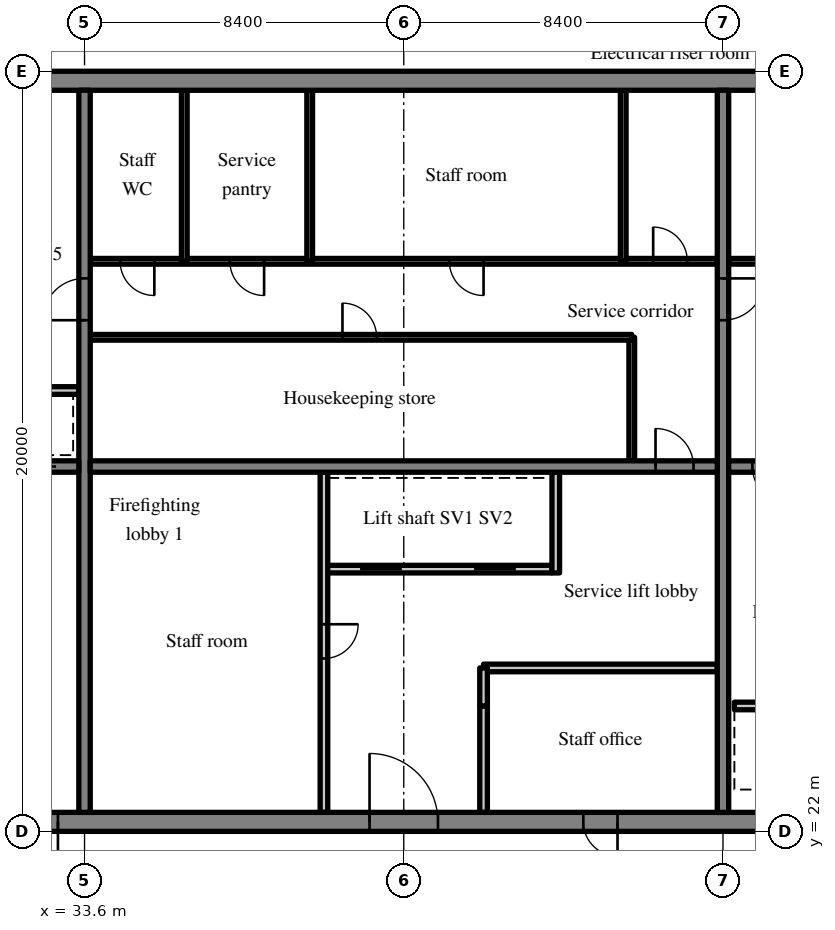
"""IFC4 building model, lengths in metres.
Left out: names, types, materials, properties, quantities, classifications, styles, units other than length and angle.
Written with IfcOpenShell. Run it as: python <this file> out.ifc"""

import sys

from ifc_helpers import new_model, si_unit, direction, frame, frame_2d, origin, place, context, subcontext, project, spatial, rectangle, extrude, source, transform, mapped, element, fill, save


model = new_model("IFC4")
c1 = context("Model", 3, precision=1e-05, world=origin(), true_north=direction((0.0, 1.0)))
c2 = subcontext(c1, "Body", "Model", "MODEL_VIEW")
j1 = project(units=[si_unit("LENGTHUNIT", "METRE"), si_unit("PLANEANGLEUNIT", "RADIAN")], contexts=[c1])
p1 = place(None, origin())
s1 = spatial("IfcSite", under=j1, at=p1, CompositionType="ELEMENT")
p2 = place(p1, origin())
s2 = spatial("IfcBuilding", under=s1, at=p2, CompositionType="ELEMENT")
p3 = place(p2, frame((0.0, 0.0, 277.7)))
s3 = spatial("IfcBuildingStorey", under=s2, at=p3, CompositionType="ELEMENT", Elevation=277.7)
m1 = source(origin(), c2, "Body", "SweptSolid", [
    extrude(rectangle(XDim=50.4, YDim=0.5, at=frame_2d((25.2, 0.0))), origin(), (0.0, 0.0, 1.0), 3.72),
])
p4 = place(p3, frame((25.2, 22.25, 0.0), z_axis=(0.0, 0.0, 1.0), x_axis=(1.0, 0.0, 0.0)))
e1 = element("IfcWall", 1, at=p4, inside=s3, PredefinedType="SHEAR", context=c2, shape_type="MappedRepresentation", body=[
    mapped(m1, transform((0.0, 0.0, 0.0), scale=1.0)),
])
m2 = source(origin(), c2, "Body", "SweptSolid", [
    extrude(rectangle(XDim=1.8, YDim=2.1, at=frame_2d((0.9, 1.05))), frame((0.0, 0.26, 0.0), z_axis=(0.0, -1.0, 0.0), x_axis=(1.0, 0.0, 0.0)), (0.0, 0.0, 1.0), 0.52),
])
p5 = place(p4, frame((15.9, 0.0, 0.0)))
e2 = element("IfcOpeningElement", 2, at=p5, cuts=e1, PredefinedType="OPENING", context=c2, shape_type="MappedRepresentation", body=[
    mapped(m2, transform((0.0, 0.0, 0.0), scale=1.0)),
])
m3 = source(origin(), c2, "Body", "SweptSolid", [
    extrude(rectangle(XDim=0.9, YDim=2.1, at=frame_2d((0.45, 1.05))), frame((0.0, 0.26, 0.0), z_axis=(0.0, -1.0, 0.0), x_axis=(1.0, 0.0, 0.0)), (0.0, 0.0, 1.0), 0.52),
])
p6 = place(p4, frame((21.525, 0.0, 0.0)))
e3 = element("IfcOpeningElement", 3, at=p6, cuts=e1, PredefinedType="OPENING", context=c2, shape_type="MappedRepresentation", body=[
    mapped(m3, transform((0.0, 0.0, 0.0), scale=1.0)),
])
p7 = place(p4, frame((32.7, 0.0, 0.0)))
e4 = element("IfcOpeningElement", 4, at=p7, cuts=e1, PredefinedType="OPENING", context=c2, shape_type="MappedRepresentation", body=[
    mapped(m2, transform((0.0, 0.0, 0.0), scale=1.0)),
])
m4 = source(origin(), c2, "Body", "SweptSolid", [
    extrude(rectangle(XDim=1.2, YDim=2.1, at=frame_2d((0.6, 1.05))), frame((0.0, 0.26, 0.0), z_axis=(0.0, -1.0, 0.0), x_axis=(1.0, 0.0, 0.0)), (0.0, 0.0, 1.0), 0.52),
])
p8 = place(p4, frame((6.5, 0.0, 0.0)))
e5 = element("IfcOpeningElement", 5, at=p8, cuts=e1, PredefinedType="OPENING", context=c2, shape_type="MappedRepresentation", body=[
    mapped(m4, transform((0.0, 0.0, 0.0), scale=1.0)),
])
p9 = place(p4, frame((47.975, 0.0, 0.0)))
e6 = element("IfcOpeningElement", 6, at=p9, cuts=e1, PredefinedType="OPENING", context=c2, shape_type="MappedRepresentation", body=[
    mapped(m4, transform((0.0, 0.0, 0.0), scale=1.0)),
])
p10 = place(p3, frame((25.2, 41.75, 0.0), z_axis=(0.0, 0.0, 1.0), x_axis=(1.0, 0.0, 0.0)))
e7 = element("IfcWall", 7, at=p10, inside=s3, PredefinedType="SHEAR", context=c2, shape_type="MappedRepresentation", body=[
    mapped(m1, transform((0.0, 0.0, 0.0), scale=1.0)),
])
m5 = source(origin(), c2, "Body", "SweptSolid", [
    extrude(rectangle(XDim=19.0, YDim=0.3, at=frame_2d((9.5, 0.0))), origin(), (0.0, 0.0, 1.0), 3.72),
])
p11 = place(p3, frame((33.6, 22.5, 0.0), z_axis=(0.0, 0.0, 1.0), x_axis=(0.0, 1.0, 0.0)))
e8 = element("IfcWall", 8, at=p11, inside=s3, PredefinedType="SHEAR", context=c2, shape_type="MappedRepresentation", body=[
    mapped(m5, transform((0.0, 0.0, 0.0), scale=1.0)),
])
m6 = source(origin(), c2, "Body", "SweptSolid", [
    extrude(rectangle(XDim=1.1, YDim=2.1, at=frame_2d((0.55, 1.05))), frame((0.0, 0.16, 0.0), z_axis=(0.0, -1.0, 0.0), x_axis=(1.0, 0.0, 0.0)), (0.0, 0.0, 1.0), 0.32),
])
p12 = place(p11, frame((12.95, 0.0, 0.0)))
e9 = element("IfcOpeningElement", 9, at=p12, cuts=e8, PredefinedType="OPENING", context=c2, shape_type="MappedRepresentation", body=[
    mapped(m6, transform((0.0, 0.0, 0.0), scale=1.0)),
])
p13 = place(p3, frame((50.4, 22.5, 0.0), z_axis=(0.0, 0.0, 1.0), x_axis=(0.0, 1.0, 0.0)))
e10 = element("IfcWall", 10, at=p13, inside=s3, PredefinedType="SHEAR", context=c2, shape_type="MappedRepresentation", body=[
    mapped(m5, transform((0.0, 0.0, 0.0), scale=1.0)),
])
p14 = place(p13, frame((12.95, 0.0, 0.0)))
e11 = element("IfcOpeningElement", 11, at=p14, cuts=e10, PredefinedType="OPENING", context=c2, shape_type="MappedRepresentation", body=[
    mapped(m6, transform((0.0, 0.0, 0.0), scale=1.0)),
])
m7 = source(origin(), c2, "Body", "SweptSolid", [
    extrude(rectangle(XDim=7.75, YDim=0.3, at=frame_2d((3.875, 0.0))), origin(), (0.0, 0.0, 1.0), 3.72),
])
p15 = place(p3, frame((25.7, 31.6, 0.0), z_axis=(0.0, 0.0, 1.0), x_axis=(1.0, 0.0, 0.0)))
e12 = element("IfcWall", 12, at=p15, inside=s3, PredefinedType="SHEAR", context=c2, shape_type="MappedRepresentation", body=[
    mapped(m7, transform((0.0, 0.0, 0.0), scale=1.0)),
])
p16 = place(p15, frame((6.05, 0.0, 0.0)))
e13 = element("IfcOpeningElement", 13, at=p16, cuts=e12, PredefinedType="OPENING", context=c2, shape_type="MappedRepresentation", body=[
    mapped(m6, transform((0.0, 0.0, 0.0), scale=1.0)),
])
m8 = source(origin(), c2, "Body", "SweptSolid", [
    extrude(rectangle(XDim=16.5, YDim=0.3, at=frame_2d((8.25, 0.0))), origin(), (0.0, 0.0, 1.0), 3.72),
])
p17 = place(p3, frame((33.75, 31.6, 0.0), z_axis=(0.0, 0.0, 1.0), x_axis=(1.0, 0.0, 0.0)))
e14 = element("IfcWall", 14, at=p17, inside=s3, PredefinedType="SHEAR", context=c2, shape_type="MappedRepresentation", body=[
    mapped(m8, transform((0.0, 0.0, 0.0), scale=1.0)),
])
m9 = source(origin(), c2, "Body", "SweptSolid", [
    extrude(rectangle(XDim=1.0, YDim=2.1, at=frame_2d((0.5, 1.05))), frame((0.0, 0.16, 0.0), z_axis=(0.0, -1.0, 0.0), x_axis=(1.0, 0.0, 0.0)), (0.0, 0.0, 1.0), 0.32),
])
p18 = place(p17, frame((14.875, 0.0, 0.0)))
e15 = element("IfcOpeningElement", 15, at=p18, cuts=e14, PredefinedType="OPENING", context=c2, shape_type="MappedRepresentation", body=[
    mapped(m9, transform((0.0, 0.0, 0.0), scale=1.0)),
])
p19 = place(p3, frame((50.55, 31.6, 0.0), z_axis=(0.0, 0.0, 1.0), x_axis=(1.0, 0.0, 0.0)))
e16 = element("IfcWall", 16, at=p19, inside=s3, PredefinedType="SHEAR", context=c2, shape_type="MappedRepresentation", body=[
    mapped(m8, transform((0.0, 0.0, 0.0), scale=1.0)),
])
p20 = place(p19, frame((0.625, 0.0, 0.0)))
e17 = element("IfcOpeningElement", 17, at=p20, cuts=e16, PredefinedType="OPENING", context=c2, shape_type="MappedRepresentation", body=[
    mapped(m9, transform((0.0, 0.0, 0.0), scale=1.0)),
])
m10 = source(origin(), c2, "Body", "SweptSolid", [
    extrude(rectangle(XDim=6.0, YDim=0.2, at=frame_2d((3.0, 0.0))), origin(), (0.0, 0.0, 1.0), 3.72),
])
p21 = place(p3, frame((39.9, 28.9, 0.0), z_axis=(0.0, 0.0, 1.0), x_axis=(1.0, 0.0, 0.0)))
e18 = element("IfcWall", 18, at=p21, inside=s3, PredefinedType="SOLIDWALL", context=c2, shape_type="MappedRepresentation", body=[
    mapped(m10, transform((0.0, 0.0, 0.0), scale=1.0)),
])
m11 = source(origin(), c2, "Body", "SweptSolid", [
    extrude(rectangle(XDim=1.1, YDim=2.1, at=frame_2d((0.55, 1.05))), frame((0.0, 0.11, 0.0), z_axis=(0.0, -1.0, 0.0), x_axis=(1.0, 0.0, 0.0)), (0.0, 0.0, 1.0), 0.22),
])
p22 = place(p21, frame((0.95, 0.0, 0.0)))
e19 = element("IfcOpeningElement", 19, at=p22, cuts=e18, PredefinedType="OPENING", context=c2, shape_type="MappedRepresentation", body=[
    mapped(m11, transform((0.0, 0.0, 0.0), scale=1.0)),
])
p23 = place(p21, frame((3.95, 0.0, 0.0)))
e20 = element("IfcOpeningElement", 20, at=p23, cuts=e18, PredefinedType="OPENING", context=c2, shape_type="MappedRepresentation", body=[
    mapped(m11, transform((0.0, 0.0, 0.0), scale=1.0)),
])
m12 = source(origin(), c2, "Body", "SweptSolid", [
    extrude(rectangle(XDim=8.95, YDim=0.2, at=frame_2d((4.475, 0.0))), origin(), (0.0, 0.0, 1.0), 3.72),
])
p24 = place(p3, frame((39.9, 22.5, 0.0), z_axis=(0.0, 0.0, 1.0), x_axis=(0.0, 1.0, 0.0)))
e21 = element("IfcWall", 21, at=p24, inside=s3, PredefinedType="PARTITIONING", context=c2, shape_type="MappedRepresentation", body=[
    mapped(m12, transform((0.0, 0.0, 0.0), scale=1.0)),
])
m13 = source(origin(), c2, "Body", "SweptSolid", [
    extrude(rectangle(XDim=0.9, YDim=2.1, at=frame_2d((0.45, 1.05))), frame((0.0, 0.11, 0.0), z_axis=(0.0, -1.0, 0.0), x_axis=(1.0, 0.0, 0.0)), (0.0, 0.0, 1.0), 0.22),
])
p25 = place(p24, frame((4.05, 0.0, 0.0)))
e22 = element("IfcOpeningElement", 22, at=p25, cuts=e21, PredefinedType="OPENING", context=c2, shape_type="MappedRepresentation", body=[
    mapped(m13, transform((0.0, 0.0, 0.0), scale=1.0)),
])
m14 = source(origin(), c2, "Body", "SweptSolid", [
    extrude(rectangle(XDim=2.8, YDim=0.2, at=frame_2d((1.4, 0.0))), origin(), (0.0, 0.0, 1.0), 3.72),
])
p26 = place(p3, frame((44.1, 22.5, 0.0), z_axis=(0.0, 0.0, 1.0), x_axis=(0.0, 1.0, 0.0)))
e23 = element("IfcWall", 23, at=p26, inside=s3, PredefinedType="PARTITIONING", context=c2, shape_type="MappedRepresentation", body=[
    mapped(m14, transform((0.0, 0.0, 0.0), scale=1.0)),
])
m15 = source(origin(), c2, "Body", "SweptSolid", [
    extrude(rectangle(XDim=2.65, YDim=0.2, at=frame_2d((1.325, 0.0))), origin(), (0.0, 0.0, 1.0), 3.72),
])
p27 = place(p3, frame((46.0, 28.8, 0.0), z_axis=(0.0, 0.0, 1.0), x_axis=(0.0, 1.0, 0.0)))
e24 = element("IfcWall", 24, at=p27, inside=s3, PredefinedType="SOLIDWALL", context=c2, shape_type="MappedRepresentation", body=[
    mapped(m15, transform((0.0, 0.0, 0.0), scale=1.0)),
])
m16 = source(origin(), c2, "Body", "SweptSolid", [
    extrude(rectangle(XDim=6.15, YDim=0.2, at=frame_2d((3.075, 0.0))), origin(), (0.0, 0.0, 1.0), 3.72),
])
p28 = place(p3, frame((44.1, 26.3, 0.0), z_axis=(0.0, 0.0, 1.0), x_axis=(1.0, 0.0, 0.0)))
e25 = element("IfcWall", 25, at=p28, inside=s3, PredefinedType="PARTITIONING", context=c2, shape_type="MappedRepresentation", body=[
    mapped(m16, transform((0.0, 0.0, 0.0), scale=1.0)),
])
m17 = source(origin(), c2, "Body", "SweptSolid", [
    extrude(rectangle(XDim=1.0, YDim=0.2, at=frame_2d((0.5, 0.0))), origin(), (0.0, 0.0, 1.0), 3.72),
])
p29 = place(p3, frame((44.1, 25.3, 0.0), z_axis=(0.0, 0.0, 1.0), x_axis=(0.0, 1.0, 0.0)))
e26 = element("IfcWall", 26, at=p29, inside=s3, PredefinedType="PARTITIONING", context=c2, shape_type="MappedRepresentation", body=[
    mapped(m17, transform((0.0, 0.0, 0.0), scale=1.0)),
])
m18 = source(origin(), c2, "Body", "SweptSolid", [
    extrude(rectangle(XDim=3.25, YDim=0.15, at=frame_2d((1.625, 0.0))), origin(), (0.0, 0.0, 1.0), 3.72),
])
p30 = place(p3, frame((48.0, 31.75, 0.0), z_axis=(0.0, 0.0, 1.0), x_axis=(0.0, 1.0, 0.0)))
e27 = element("IfcWall", 27, at=p30, inside=s3, PredefinedType="PARTITIONING", context=c2, shape_type="MappedRepresentation", body=[
    mapped(m18, transform((0.0, 0.0, 0.0), scale=1.0)),
])
m19 = source(origin(), c2, "Body", "SweptSolid", [
    extrude(rectangle(XDim=14.25, YDim=0.15, at=frame_2d((7.125, 0.0))), origin(), (0.0, 0.0, 1.0), 3.72),
])
p31 = place(p3, frame((33.75, 35.0, 0.0), z_axis=(0.0, 0.0, 1.0), x_axis=(1.0, 0.0, 0.0)))
e28 = element("IfcWall", 28, at=p31, inside=s3, PredefinedType="PARTITIONING", context=c2, shape_type="MappedRepresentation", body=[
    mapped(m19, transform((0.0, 0.0, 0.0), scale=1.0)),
])
m20 = source(origin(), c2, "Body", "SweptSolid", [
    extrude(rectangle(XDim=0.9, YDim=2.1, at=frame_2d((0.45, 1.05))), frame((0.0, 0.085, 0.0), z_axis=(0.0, -1.0, 0.0), x_axis=(1.0, 0.0, 0.0)), (0.0, 0.0, 1.0), 0.17),
])
p32 = place(p31, frame((6.637, 0.0, 0.0)))
e29 = element("IfcOpeningElement", 29, at=p32, cuts=e28, PredefinedType="OPENING", context=c2, shape_type="MappedRepresentation", body=[
    mapped(m20, transform((0.0, 0.0, 0.0), scale=1.0)),
])
m21 = source(origin(), c2, "Body", "SweptSolid", [
    extrude(rectangle(XDim=16.5, YDim=0.15, at=frame_2d((8.25, 0.0))), origin(), (0.0, 0.0, 1.0), 3.72),
])
p33 = place(p3, frame((33.75, 37.0, 0.0), z_axis=(0.0, 0.0, 1.0), x_axis=(1.0, 0.0, 0.0)))
e30 = element("IfcWall", 30, at=p33, inside=s3, PredefinedType="PARTITIONING", context=c2, shape_type="MappedRepresentation", body=[
    mapped(m21, transform((0.0, 0.0, 0.0), scale=1.0)),
])
p34 = place(p33, frame((0.787, 0.0, 0.0)))
e31 = element("IfcOpeningElement", 31, at=p34, cuts=e30, PredefinedType="OPENING", context=c2, shape_type="MappedRepresentation", body=[
    mapped(m20, transform((0.0, 0.0, 0.0), scale=1.0)),
])
p35 = place(p33, frame((3.675, 0.0, 0.0)))
e32 = element("IfcOpeningElement", 32, at=p35, cuts=e30, PredefinedType="OPENING", context=c2, shape_type="MappedRepresentation", body=[
    mapped(m20, transform((0.0, 0.0, 0.0), scale=1.0)),
])
p36 = place(p33, frame((9.45, 0.0, 0.0)))
e33 = element("IfcOpeningElement", 33, at=p36, cuts=e30, PredefinedType="OPENING", context=c2, shape_type="MappedRepresentation", body=[
    mapped(m20, transform((0.0, 0.0, 0.0), scale=1.0)),
])
p37 = place(p33, frame((14.813, 0.0, 0.0)))
e34 = element("IfcOpeningElement", 34, at=p37, cuts=e30, PredefinedType="OPENING", context=c2, shape_type="MappedRepresentation", body=[
    mapped(m20, transform((0.0, 0.0, 0.0), scale=1.0)),
])
m22 = source(origin(), c2, "Body", "SweptSolid", [
    extrude(rectangle(XDim=4.5, YDim=0.15, at=frame_2d((2.25, 0.0))), origin(), (0.0, 0.0, 1.0), 3.72),
])
for number, where, z_axis, x_axis in (
    (35, (36.225, 37.0, 0.0), (0.0, 0.0, 1.0), (0.0, 1.0, 0.0)),
    (36, (39.525, 37.0, 0.0), (0.0, 0.0, 1.0), (0.0, 1.0, 0.0)),
    (37, (47.775, 37.0, 0.0), (0.0, 0.0, 1.0), (0.0, 1.0, 0.0)),
):
    element("IfcWall", number, at=place(p3, frame(where, z_axis=z_axis, x_axis=x_axis)), inside=s3, PredefinedType="PARTITIONING", context=c2, shape_type="MappedRepresentation", body=[
        mapped(m22, transform((0.0, 0.0, 0.0), scale=1.0)),
    ])
p38 = place(p3, frame((56.7, 25.3, 0.0), z_axis=(0.0, 0.0, 1.0), x_axis=(-1.0, 0.0, 0.0)))
e38 = element("IfcWall", 38, at=p38, inside=s3, PredefinedType="SOLIDWALL", context=c2, shape_type="MappedRepresentation", body=[
    mapped(m10, transform((0.0, 0.0, 0.0), scale=1.0)),
])
p39 = place(p38, frame((0.95, 0.0, 0.0)))
e39 = element("IfcOpeningElement", 39, at=p39, cuts=e38, PredefinedType="OPENING", context=c2, shape_type="MappedRepresentation", body=[
    mapped(m11, transform((0.0, 0.0, 0.0), scale=1.0)),
])
p40 = place(p38, frame((3.95, 0.0, 0.0)))
e40 = element("IfcOpeningElement", 40, at=p40, cuts=e38, PredefinedType="OPENING", context=c2, shape_type="MappedRepresentation", body=[
    mapped(m11, transform((0.0, 0.0, 0.0), scale=1.0)),
])
p41 = place(p3, frame((67.05, 37.0, 0.0), z_axis=(0.0, 0.0, 1.0), x_axis=(-1.0, 0.0, 0.0)))
e41 = element("IfcWall", 41, at=p41, inside=s3, PredefinedType="PARTITIONING", context=c2, shape_type="MappedRepresentation", body=[
    mapped(m21, transform((0.0, 0.0, 0.0), scale=1.0)),
])
p42 = place(p41, frame((6.563, 0.0, 0.0)))
e42 = element("IfcOpeningElement", 42, at=p42, cuts=e41, PredefinedType="OPENING", context=c2, shape_type="MappedRepresentation", body=[
    mapped(m20, transform((0.0, 0.0, 0.0), scale=1.0)),
])
p43 = place(p41, frame((14.813, 0.0, 0.0)))
e43 = element("IfcOpeningElement", 43, at=p43, cuts=e41, PredefinedType="OPENING", context=c2, shape_type="MappedRepresentation", body=[
    mapped(m20, transform((0.0, 0.0, 0.0), scale=1.0)),
])
m23 = source(origin(), c2, "Body", "SweptSolid", [
    extrude(rectangle(XDim=2.3, YDim=0.2, at=frame_2d((1.15, 0.0))), origin(), (0.0, 0.0, 1.0), 3.72),
])
p44 = place(p3, frame((31.15, 33.6, 0.0), z_axis=(0.0, 0.0, 1.0), x_axis=(1.0, 0.0, 0.0)))
e44 = element("IfcWall", 44, at=p44, inside=s3, PredefinedType="SOLIDWALL", context=c2, shape_type="MappedRepresentation", body=[
    mapped(m23, transform((0.0, 0.0, 0.0), scale=1.0)),
])
m24 = source(origin(), c2, "Body", "SweptSolid", [
    extrude(rectangle(XDim=1.8, YDim=2.1, at=frame_2d((0.9, 1.05))), frame((0.0, 0.175, 0.0), z_axis=(0.0, -1.0, 0.0), x_axis=(1.0, 0.0, 0.0)), (0.0, 0.0, 1.0), 0.05),
])
p45 = place(p5, origin())
e45 = element("IfcDoor", 45, at=p45, inside=s3, OperationType="DOUBLE_DOOR_SINGLE_SWING", PredefinedType="DOOR", context=c2, shape_type="MappedRepresentation", body=[
    mapped(m24, transform((0.0, 0.0, 0.0), scale=1.0)),
])
fill(e2, e45)
m25 = source(origin(), c2, "Body", "SweptSolid", [
    extrude(rectangle(XDim=1.0, YDim=2.1, at=frame_2d((0.5, 1.05))), frame((0.0, 0.025, 0.0), z_axis=(0.0, -1.0, 0.0), x_axis=(1.0, 0.0, 0.0)), (0.0, 0.0, 1.0), 0.05),
])
p46 = place(p18, origin())
e46 = element("IfcDoor", 46, at=p46, inside=s3, OperationType="SINGLE_SWING_LEFT", PredefinedType="DOOR", context=c2, shape_type="MappedRepresentation", body=[
    mapped(m25, transform((0.0, 0.0, 0.0), scale=1.0)),
])
fill(e15, e46)
m26 = source(origin(), c2, "Body", "SweptSolid", [
    extrude(rectangle(XDim=1.1, YDim=2.1, at=frame_2d((0.55, 1.05))), frame((0.0, 0.025, 0.0), z_axis=(0.0, -1.0, 0.0), x_axis=(1.0, 0.0, 0.0)), (0.0, 0.0, 1.0), 0.05),
])
p47 = place(p22, origin())
e47 = element("IfcDoor", 47, at=p47, inside=s3, OperationType="SLIDING_TO_LEFT", PredefinedType="DOOR", context=c2, shape_type="MappedRepresentation", body=[
    mapped(m26, transform((0.0, 0.0, 0.0), scale=1.0)),
])
fill(e19, e47)
p48 = place(p23, origin())
e48 = element("IfcDoor", 48, at=p48, inside=s3, OperationType="SLIDING_TO_RIGHT", PredefinedType="DOOR", context=c2, shape_type="MappedRepresentation", body=[
    mapped(m26, transform((0.0, 0.0, 0.0), scale=1.0)),
])
fill(e20, e48)
m27 = source(origin(), c2, "Body", "SweptSolid", [
    extrude(rectangle(XDim=0.9, YDim=2.1, at=frame_2d((0.45, 1.05))), frame((0.0, 0.025, 0.0), z_axis=(0.0, -1.0, 0.0), x_axis=(1.0, 0.0, 0.0)), (0.0, 0.0, 1.0), 0.05),
])
p49 = place(p25, origin())
e49 = element("IfcDoor", 49, at=p49, inside=s3, OperationType="SINGLE_SWING_RIGHT", PredefinedType="DOOR", context=c2, shape_type="MappedRepresentation", body=[
    mapped(m27, transform((0.0, 0.0, 0.0), scale=1.0)),
])
fill(e22, e49)
m28 = source(origin(), c2, "Body", "SweptSolid", [
    extrude(rectangle(XDim=0.9, YDim=2.1, at=frame_2d((0.45, 1.05))), frame((0.0, 0.175, 0.0), z_axis=(0.0, -1.0, 0.0), x_axis=(1.0, 0.0, 0.0)), (0.0, 0.0, 1.0), 0.05),
])
p50 = place(p6, origin())
e50 = element("IfcDoor", 50, at=p50, inside=s3, OperationType="SINGLE_SWING_RIGHT", PredefinedType="DOOR", context=c2, shape_type="MappedRepresentation", body=[
    mapped(m28, transform((0.0, 0.0, 0.0), scale=1.0)),
])
fill(e3, e50)
p51 = place(p32, origin())
e51 = element("IfcDoor", 51, at=p51, inside=s3, OperationType="SINGLE_SWING_LEFT", PredefinedType="DOOR", context=c2, shape_type="MappedRepresentation", body=[
    mapped(m27, transform((0.0, 0.0, 0.0), scale=1.0)),
])
fill(e29, e51)
p52 = place(p34, origin())
e52 = element("IfcDoor", 52, at=p52, inside=s3, OperationType="SINGLE_SWING_RIGHT", PredefinedType="DOOR", context=c2, shape_type="MappedRepresentation", body=[
    mapped(m27, transform((0.0, 0.0, 0.0), scale=1.0)),
])
fill(e31, e52)
p53 = place(p35, origin())
e53 = element("IfcDoor", 53, at=p53, inside=s3, OperationType="SINGLE_SWING_RIGHT", PredefinedType="DOOR", context=c2, shape_type="MappedRepresentation", body=[
    mapped(m27, transform((0.0, 0.0, 0.0), scale=1.0)),
])
fill(e32, e53)
p54 = place(p36, origin())
e54 = element("IfcDoor", 54, at=p54, inside=s3, OperationType="SINGLE_SWING_RIGHT", PredefinedType="DOOR", context=c2, shape_type="MappedRepresentation", body=[
    mapped(m27, transform((0.0, 0.0, 0.0), scale=1.0)),
])
fill(e33, e54)
p55 = place(p37, origin())
e55 = element("IfcDoor", 55, at=p55, inside=s3, OperationType="SINGLE_SWING_LEFT", PredefinedType="DOOR", context=c2, shape_type="MappedRepresentation", body=[
    mapped(m27, transform((0.0, 0.0, 0.0), scale=1.0)),
])
fill(e34, e55)
p56 = place(p20, origin())
e56 = element("IfcDoor", 56, at=p56, inside=s3, OperationType="SINGLE_SWING_RIGHT", PredefinedType="DOOR", context=c2, shape_type="MappedRepresentation", body=[
    mapped(m25, transform((0.0, 0.0, 0.0), scale=1.0)),
])
fill(e17, e56)
m29 = source(origin(), c2, "Body", "SweptSolid", [
    extrude(rectangle(XDim=1.2, YDim=2.1, at=frame_2d((0.6, 1.05))), frame((0.0, 0.175, 0.0), z_axis=(0.0, -1.0, 0.0), x_axis=(1.0, 0.0, 0.0)), (0.0, 0.0, 1.0), 0.05),
])
p57 = place(p8, origin())
e57 = element("IfcDoor", 57, at=p57, inside=s3, OperationType="SINGLE_SWING_RIGHT", PredefinedType="DOOR", context=c2, shape_type="MappedRepresentation", body=[
    mapped(m29, transform((0.0, 0.0, 0.0), scale=1.0)),
])
fill(e5, e57)
p58 = place(p16, origin())
e58 = element("IfcDoor", 58, at=p58, inside=s3, OperationType="SLIDING_TO_RIGHT", PredefinedType="DOOR", context=c2, shape_type="MappedRepresentation", body=[
    mapped(m26, transform((0.0, 0.0, 0.0), scale=1.0)),
])
fill(e13, e58)
p59 = place(p12, origin())
e59 = element("IfcDoor", 59, at=p59, inside=s3, OperationType="SINGLE_SWING_LEFT", PredefinedType="DOOR", context=c2, shape_type="MappedRepresentation", body=[
    mapped(m26, transform((0.0, 0.0, 0.0), scale=1.0)),
])
fill(e9, e59)
p60 = place(p14, origin())
e60 = element("IfcDoor", 60, at=p60, inside=s3, OperationType="SINGLE_SWING_RIGHT", PredefinedType="DOOR", context=c2, shape_type="MappedRepresentation", body=[
    mapped(m26, transform((0.0, 0.0, 0.0), scale=1.0)),
])
fill(e11, e60)
save(model, sys.argv[1])
